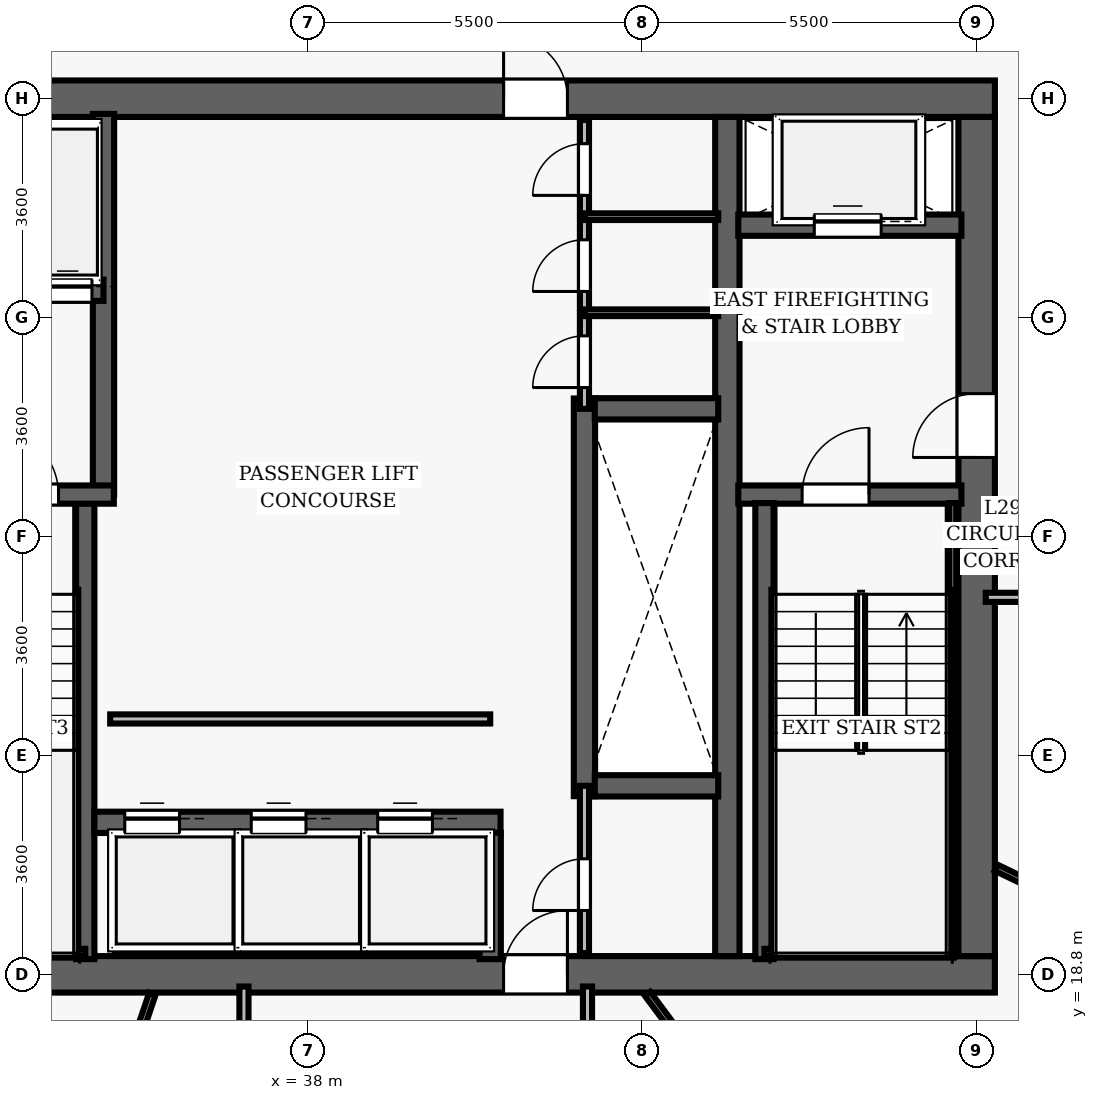
"""IFC4 building model, lengths in metres.
Left out: names, types, materials, properties, quantities, classifications, styles, units other than length and angle.
Written with IfcOpenShell. Run it as: python <this file> out.ifc"""

import sys

from ifc_helpers import new_model, si_unit, direction, frame, frame_2d, origin, place, context, subcontext, project, spatial, rectangle, extrude, element, fill, save


model = new_model("IFC4")
c1 = context("Model", 3, precision=1e-05, world=origin(), true_north=direction((0.0, 1.0)))
c2 = subcontext(c1, "Body", "Model", "MODEL_VIEW")
j1 = project(units=[si_unit("LENGTHUNIT", "METRE"), si_unit("PLANEANGLEUNIT", "RADIAN")], contexts=[c1])
p1 = place(None, origin())
s1 = spatial("IfcSite", under=j1, at=p1, CompositionType="ELEMENT")
p2 = place(p1, origin())
s2 = spatial("IfcBuilding", under=s1, at=p2, CompositionType="ELEMENT")
p3 = place(p2, frame((0.0, 0.0, 120.3)))
s3 = spatial("IfcBuildingStorey", under=s2, at=p3, CompositionType="ELEMENT", Elevation=120.3)
p4 = place(p3, frame((26.7, 18.8, 0.0), z_axis=(0.0, 0.0, 1.0), x_axis=(1.0, 0.0, 0.0)))
e1 = element("IfcWall", 1, at=p4, inside=s3, PredefinedType="SHEAR", context=c2, shape_type="SweptSolid", body=[
    extrude(rectangle(XDim=22.6, YDim=0.6, at=frame_2d((11.3, 0.0))), origin(), (0.0, 0.0, 1.0), 3.5),
])
p5 = place(p4, frame((14.52, 0.0, 0.0)))
e2 = element("IfcOpeningElement", 2, at=p5, cuts=e1, PredefinedType="OPENING", context=c2, shape_type="SweptSolid", body=[
    extrude(rectangle(XDim=1.05, YDim=2.15, at=frame_2d((0.525, 1.075))), frame((0.0, 0.31, 0.0), z_axis=(0.0, -1.0, 0.0), x_axis=(1.0, 0.0, 0.0)), (0.0, 0.0, 1.0), 0.62),
])
p6 = place(p3, frame((26.7, 33.2, 0.0), z_axis=(0.0, 0.0, 1.0), x_axis=(1.0, 0.0, 0.0)))
e3 = element("IfcWall", 3, at=p6, inside=s3, PredefinedType="SHEAR", context=c2, shape_type="SweptSolid", body=[
    extrude(rectangle(XDim=22.6, YDim=0.6, at=frame_2d((11.3, 0.0))), origin(), (0.0, 0.0, 1.0), 3.5),
])
p7 = place(p6, frame((4.62, 0.0, 0.0)))
e4 = element("IfcOpeningElement", 4, at=p7, cuts=e3, PredefinedType="OPENING", context=c2, shape_type="SweptSolid", body=[
    extrude(rectangle(XDim=1.05, YDim=2.15, at=frame_2d((0.525, 1.075))), frame((0.0, 0.31, 0.0), z_axis=(0.0, -1.0, 0.0), x_axis=(1.0, 0.0, 0.0)), (0.0, 0.0, 1.0), 0.62),
])
p8 = place(p6, frame((14.52, 0.0, 0.0)))
e5 = element("IfcOpeningElement", 5, at=p8, cuts=e3, PredefinedType="OPENING", context=c2, shape_type="SweptSolid", body=[
    extrude(rectangle(XDim=1.05, YDim=2.15, at=frame_2d((0.525, 1.075))), frame((0.0, 0.31, 0.0), z_axis=(0.0, -1.0, 0.0), x_axis=(1.0, 0.0, 0.0)), (0.0, 0.0, 1.0), 0.62),
])
p9 = place(p3, frame((49.0, 19.1, 0.0), z_axis=(0.0, 0.0, 1.0), x_axis=(0.0, 1.0, 0.0)))
e6 = element("IfcWall", 6, at=p9, inside=s3, PredefinedType="SHEAR", context=c2, shape_type="SweptSolid", body=[
    extrude(rectangle(XDim=13.8, YDim=0.6, at=frame_2d((6.9, 0.0))), origin(), (0.0, 0.0, 1.0), 3.5),
])
p10 = place(p9, frame((8.2, 0.0, 0.0)))
e7 = element("IfcOpeningElement", 7, at=p10, cuts=e6, PredefinedType="OPENING", context=c2, shape_type="SweptSolid", body=[
    extrude(rectangle(XDim=1.05, YDim=2.15, at=frame_2d((0.525, 1.075))), frame((0.0, 0.31, 0.0), z_axis=(0.0, -1.0, 0.0), x_axis=(1.0, 0.0, 0.0)), (0.0, 0.0, 1.0), 0.62),
])
p11 = place(p3, frame((44.9, 19.1, 0.0), z_axis=(0.0, 0.0, 1.0), x_axis=(0.0, 1.0, 0.0)))
e8 = element("IfcWall", 8, at=p11, inside=s3, PredefinedType="SHEAR", context=c2, shape_type="SweptSolid", body=[
    extrude(rectangle(XDim=13.8, YDim=0.4, at=frame_2d((6.9, 0.0))), origin(), (0.0, 0.0, 1.0), 3.5),
])
p12 = place(p3, frame((45.08, 26.69, 0.0), z_axis=(0.0, 0.0, 1.0), x_axis=(1.0, 0.0, 0.0)))
e9 = element("IfcWall", 9, at=p12, inside=s3, PredefinedType="SHEAR", context=c2, shape_type="SweptSolid", body=[
    extrude(rectangle(XDim=3.67, YDim=0.3, at=frame_2d((1.835, 0.0))), origin(), (0.0, 0.0, 1.0), 3.5),
])
p13 = place(p12, frame((1.05, 0.0, 0.0)))
e10 = element("IfcOpeningElement", 10, at=p13, cuts=e9, PredefinedType="OPENING", context=c2, shape_type="SweptSolid", body=[
    extrude(rectangle(XDim=1.1, YDim=2.15, at=frame_2d((0.55, 1.075))), frame((0.0, 0.16, 0.0), z_axis=(0.0, -1.0, 0.0), x_axis=(1.0, 0.0, 0.0)), (0.0, 0.0, 1.0), 0.32),
])
p14 = place(p3, frame((45.51, 19.05, 0.0), z_axis=(0.0, 0.0, 1.0), x_axis=(0.0, 1.0, 0.0)))
e11 = element("IfcWall", 11, at=p14, inside=s3, PredefinedType="SHEAR", context=c2, shape_type="SweptSolid", body=[
    extrude(rectangle(XDim=7.5, YDim=0.3, at=frame_2d((3.75, 0.0))), origin(), (0.0, 0.0, 1.0), 3.5),
])
p15 = place(p3, frame((48.605, 19.1, 0.0), z_axis=(0.0, 0.0, 1.0), x_axis=(0.0, 1.0, 0.0)))
e12 = element("IfcWall", 12, at=p15, inside=s3, PredefinedType="SHEAR", context=c2, shape_type="SweptSolid", body=[
    extrude(rectangle(XDim=7.45, YDim=0.12, at=frame_2d((3.725, 0.0))), origin(), (0.0, 0.0, 1.0), 3.5),
])
p16 = place(p3, frame((45.51, 19.16, 0.0), z_axis=(0.0, 0.0, 1.0), x_axis=(1.0, 0.0, 0.0)))
e13 = element("IfcWall", 13, at=p16, inside=s3, PredefinedType="SHEAR", context=c2, shape_type="SweptSolid", body=[
    extrude(rectangle(XDim=3.095, YDim=0.12, at=frame_2d((1.547, 0.0))), origin(), (0.0, 0.0, 1.0), 3.5),
])
p17 = place(p3, frame((45.08, 31.12, 0.0), z_axis=(0.0, 0.0, 1.0), x_axis=(1.0, 0.0, 0.0)))
e14 = element("IfcWall", 14, at=p17, inside=s3, PredefinedType="SHEAR", context=c2, shape_type="SweptSolid", body=[
    extrude(rectangle(XDim=3.67, YDim=0.35, at=frame_2d((1.835, 0.0))), origin(), (0.0, 0.0, 1.0), 2.675),
])
p18 = place(p17, frame((1.25, 0.0, 0.0)))
e15 = element("IfcOpeningElement", 15, at=p18, cuts=e14, PredefinedType="OPENING", context=c2, shape_type="SweptSolid", body=[
    extrude(rectangle(XDim=1.1, YDim=2.15, at=frame_2d((0.55, 1.075))), frame((0.0, 0.185, 0.0), z_axis=(0.0, -1.0, 0.0), x_axis=(1.0, 0.0, 0.0)), (0.0, 0.0, 1.0), 0.37),
])
p19 = place(p3, frame((34.34, 19.05, 0.0), z_axis=(0.0, 0.0, 1.0), x_axis=(0.0, 1.0, 0.0)))
e16 = element("IfcWall", 16, at=p19, inside=s3, PredefinedType="SHEAR", context=c2, shape_type="SweptSolid", body=[
    extrude(rectangle(XDim=7.5, YDim=0.3, at=frame_2d((3.75, 0.0))), origin(), (0.0, 0.0, 1.0), 3.5),
])
p20 = place(p3, frame((34.64, 26.69, 0.0), z_axis=(0.0, 0.0, 1.0), x_axis=(0.0, 1.0, 0.0)))
e17 = element("IfcWall", 17, at=p20, inside=s3, PredefinedType="SHEAR", context=c2, shape_type="SweptSolid", body=[
    extrude(rectangle(XDim=6.26, YDim=0.35, at=frame_2d((3.13, 0.0))), origin(), (0.0, 0.0, 1.0), 3.5),
])
p21 = place(p3, frame((31.25, 26.69, 0.0), z_axis=(0.0, 0.0, 1.0), x_axis=(1.0, 0.0, 0.0)))
e18 = element("IfcWall", 18, at=p21, inside=s3, PredefinedType="SHEAR", context=c2, shape_type="SweptSolid", body=[
    extrude(rectangle(XDim=3.56, YDim=0.3, at=frame_2d((1.78, 0.0))), origin(), (0.0, 0.0, 1.0), 3.5),
])
p22 = place(p21, frame((1.55, 0.0, 0.0)))
e19 = element("IfcOpeningElement", 19, at=p22, cuts=e18, PredefinedType="OPENING", context=c2, shape_type="SweptSolid", body=[
    extrude(rectangle(XDim=1.1, YDim=2.15, at=frame_2d((0.55, 1.075))), frame((0.0, 0.16, 0.0), z_axis=(0.0, -1.0, 0.0), x_axis=(1.0, 0.0, 0.0)), (0.0, 0.0, 1.0), 0.32),
])
p23 = place(p3, frame((31.3, 19.16, 0.0), z_axis=(0.0, 0.0, 1.0), x_axis=(1.0, 0.0, 0.0)))
e20 = element("IfcWall", 20, at=p23, inside=s3, PredefinedType="SHEAR", context=c2, shape_type="SweptSolid", body=[
    extrude(rectangle(XDim=3.04, YDim=0.12, at=frame_2d((1.52, 0.0))), origin(), (0.0, 0.0, 1.0), 3.5),
])
p24 = place(p3, frame((32.23, 30.05, 0.0), z_axis=(0.0, 0.0, 1.0), x_axis=(1.0, 0.0, 0.0)))
e21 = element("IfcWall", 21, at=p24, inside=s3, PredefinedType="SHEAR", context=c2, shape_type="SweptSolid", body=[
    extrude(rectangle(XDim=2.41, YDim=0.35, at=frame_2d((1.205, 0.0))), origin(), (0.0, 0.0, 1.0), 2.675),
])
p25 = place(p24, frame((0.42, 0.0, 0.0)))
e22 = element("IfcOpeningElement", 22, at=p25, cuts=e21, PredefinedType="OPENING", context=c2, shape_type="SweptSolid", body=[
    extrude(rectangle(XDim=0.8, YDim=2.15, at=frame_2d((0.4, 1.075))), frame((0.0, 0.185, 0.0), z_axis=(0.0, -1.0, 0.0), x_axis=(1.0, 0.0, 0.0)), (0.0, 0.0, 1.0), 0.37),
])
p26 = place(p24, frame((1.42, 0.0, 0.0)))
e23 = element("IfcOpeningElement", 23, at=p26, cuts=e21, PredefinedType="OPENING", context=c2, shape_type="SweptSolid", body=[
    extrude(rectangle(XDim=0.8, YDim=2.15, at=frame_2d((0.4, 1.075))), frame((0.0, 0.185, 0.0), z_axis=(0.0, -1.0, 0.0), x_axis=(1.0, 0.0, 0.0)), (0.0, 0.0, 1.0), 0.37),
])
p27 = place(p3, frame((42.55, 21.73, 0.0), z_axis=(0.0, 0.0, 1.0), x_axis=(0.0, 1.0, 0.0)))
e24 = element("IfcWall", 24, at=p27, inside=s3, PredefinedType="SHEAR", context=c2, shape_type="SweptSolid", body=[
    extrude(rectangle(XDim=6.54, YDim=0.35, at=frame_2d((3.27, 0.0))), origin(), (0.0, 0.0, 1.0), 2.675),
])
for number, where, z_axis, x_axis in (
    (25, (42.72, 21.9, 0.0), (0.0, 0.0, 1.0), (1.0, 0.0, 0.0)),
    (26, (42.72, 28.1, 0.0), (0.0, 0.0, 1.0), (1.0, 0.0, 0.0)),
):
    element("IfcWall", number, at=place(p3, frame(where, z_axis=z_axis, x_axis=x_axis)), inside=s3, PredefinedType="SHEAR", context=c2, shape_type="SweptSolid", body=[
        extrude(rectangle(XDim=2.03, YDim=0.35, at=frame_2d((1.015, 0.0))), origin(), (0.0, 0.0, 1.0), 2.675),
    ])
p28 = place(p3, frame((34.49, 21.3, 0.0), z_axis=(0.0, 0.0, 1.0), x_axis=(1.0, 0.0, 0.0)))
e27 = element("IfcWall", 27, at=p28, inside=s3, PredefinedType="SHEAR", context=c2, shape_type="SweptSolid", body=[
    extrude(rectangle(XDim=6.68, YDim=0.35, at=frame_2d((3.34, 0.0))), origin(), (0.0, 0.0, 1.0), 2.675),
])
p29 = place(p28, frame((0.5, 0.0, 0.0)))
e28 = element("IfcOpeningElement", 28, at=p29, cuts=e27, PredefinedType="OPENING", context=c2, shape_type="SweptSolid", body=[
    extrude(rectangle(XDim=0.9, YDim=2.15, at=frame_2d((0.45, 1.075))), frame((0.0, 0.185, 0.0), z_axis=(0.0, -1.0, 0.0), x_axis=(1.0, 0.0, 0.0)), (0.0, 0.0, 1.0), 0.37),
])
p30 = place(p28, frame((2.58, 0.0, 0.0)))
e29 = element("IfcOpeningElement", 29, at=p30, cuts=e27, PredefinedType="OPENING", context=c2, shape_type="SweptSolid", body=[
    extrude(rectangle(XDim=0.9, YDim=2.15, at=frame_2d((0.45, 1.075))), frame((0.0, 0.185, 0.0), z_axis=(0.0, -1.0, 0.0), x_axis=(1.0, 0.0, 0.0)), (0.0, 0.0, 1.0), 0.37),
])
p31 = place(p28, frame((4.66, 0.0, 0.0)))
e30 = element("IfcOpeningElement", 30, at=p31, cuts=e27, PredefinedType="OPENING", context=c2, shape_type="SweptSolid", body=[
    extrude(rectangle(XDim=0.9, YDim=2.15, at=frame_2d((0.45, 1.075))), frame((0.0, 0.185, 0.0), z_axis=(0.0, -1.0, 0.0), x_axis=(1.0, 0.0, 0.0)), (0.0, 0.0, 1.0), 0.37),
])
p32 = place(p3, frame((41.0, 19.05, 0.0), z_axis=(0.0, 0.0, 1.0), x_axis=(0.0, 1.0, 0.0)))
e31 = element("IfcWall", 31, at=p32, inside=s3, PredefinedType="SHEAR", context=c2, shape_type="SweptSolid", body=[
    extrude(rectangle(XDim=2.08, YDim=0.35, at=frame_2d((1.04, 0.0))), origin(), (0.0, 0.0, 1.0), 2.675),
])
p33 = place(p3, frame((34.75, 23.0, 0.0), z_axis=(0.0, 0.0, 1.0), x_axis=(1.0, 0.0, 0.0)))
e32 = element("IfcWall", 32, at=p33, inside=s3, PredefinedType="PARTITIONING", context=c2, shape_type="SweptSolid", body=[
    extrude(rectangle(XDim=6.25, YDim=0.15, at=frame_2d((3.125, 0.0))), origin(), (0.0, 0.0, 1.0), 2.675),
])
p34 = place(p3, frame((42.55, 28.1, 0.0), z_axis=(0.0, 0.0, 1.0), x_axis=(0.0, 1.0, 0.0)))
e33 = element("IfcWall", 33, at=p34, inside=s3, PredefinedType="PARTITIONING", context=c2, shape_type="SweptSolid", body=[
    extrude(rectangle(XDim=4.75, YDim=0.15, at=frame_2d((2.375, 0.0))), origin(), (0.0, 0.0, 1.0), 2.675),
])
p35 = place(p34, frame((0.35, 0.0, 0.0)))
e34 = element("IfcOpeningElement", 34, at=p35, cuts=e33, PredefinedType="OPENING", context=c2, shape_type="SweptSolid", body=[
    extrude(rectangle(XDim=0.85, YDim=2.1, at=frame_2d((0.425, 1.05))), frame((0.0, 0.085, 0.0), z_axis=(0.0, -1.0, 0.0), x_axis=(1.0, 0.0, 0.0)), (0.0, 0.0, 1.0), 0.17),
])
p36 = place(p34, frame((1.93, 0.0, 0.0)))
e35 = element("IfcOpeningElement", 35, at=p36, cuts=e33, PredefinedType="OPENING", context=c2, shape_type="SweptSolid", body=[
    extrude(rectangle(XDim=0.85, YDim=2.1, at=frame_2d((0.425, 1.05))), frame((0.0, 0.085, 0.0), z_axis=(0.0, -1.0, 0.0), x_axis=(1.0, 0.0, 0.0)), (0.0, 0.0, 1.0), 0.17),
])
p37 = place(p34, frame((3.51, 0.0, 0.0)))
e36 = element("IfcOpeningElement", 36, at=p37, cuts=e33, PredefinedType="OPENING", context=c2, shape_type="SweptSolid", body=[
    extrude(rectangle(XDim=0.85, YDim=2.1, at=frame_2d((0.425, 1.05))), frame((0.0, 0.085, 0.0), z_axis=(0.0, -1.0, 0.0), x_axis=(1.0, 0.0, 0.0)), (0.0, 0.0, 1.0), 0.17),
])
for number, where, z_axis, x_axis in (
    (37, (42.55, 29.68, 0.0), (0.0, 0.0, 1.0), (1.0, 0.0, 0.0)),
    (38, (42.55, 31.26, 0.0), (0.0, 0.0, 1.0), (1.0, 0.0, 0.0)),
):
    element("IfcWall", number, at=place(p3, frame(where, z_axis=z_axis, x_axis=x_axis)), inside=s3, PredefinedType="PARTITIONING", context=c2, shape_type="SweptSolid", body=[
        extrude(rectangle(XDim=2.2, YDim=0.11, at=frame_2d((1.1, 0.0))), origin(), (0.0, 0.0, 1.0), 2.675),
    ])
p38 = place(p3, frame((42.55, 19.15, 0.0), z_axis=(0.0, 0.0, 1.0), x_axis=(0.0, 1.0, 0.0)))
e39 = element("IfcWall", 39, at=p38, inside=s3, PredefinedType="PARTITIONING", context=c2, shape_type="SweptSolid", body=[
    extrude(rectangle(XDim=2.75, YDim=0.15, at=frame_2d((1.375, 0.0))), origin(), (0.0, 0.0, 1.0), 2.675),
])
p39 = place(p38, frame((0.7, 0.0, 0.0)))
e40 = element("IfcOpeningElement", 40, at=p39, cuts=e39, PredefinedType="OPENING", context=c2, shape_type="SweptSolid", body=[
    extrude(rectangle(XDim=0.85, YDim=2.1, at=frame_2d((0.425, 1.05))), frame((0.0, 0.085, 0.0), z_axis=(0.0, -1.0, 0.0), x_axis=(1.0, 0.0, 0.0)), (0.0, 0.0, 1.0), 0.17),
])
p40 = place(p3, frame((49.15, 25.0, 0.0), z_axis=(0.0, 0.0, 1.0), x_axis=(1.0, 0.0, 0.0)))
e41 = element("IfcWall", 41, at=p40, inside=s3, PredefinedType="PARTITIONING", context=c2, shape_type="SweptSolid", body=[
    extrude(rectangle(XDim=12.35, YDim=0.15, at=frame_2d((6.175, 0.0))), origin(), (0.0, 0.0, 1.0), 2.675),
])
p41 = place(p40, frame((2.613, 0.0, 0.0)))
e42 = element("IfcOpeningElement", 42, at=p41, cuts=e41, PredefinedType="OPENING", context=c2, shape_type="SweptSolid", body=[
    extrude(rectangle(XDim=0.95, YDim=2.15, at=frame_2d((0.475, 1.075))), frame((0.0, 0.085, 0.0), z_axis=(0.0, -1.0, 0.0), x_axis=(1.0, 0.0, 0.0)), (0.0, 0.0, 1.0), 0.17),
])
p42 = place(p3, frame((36.95, 11.2, 0.0), z_axis=(0.0, 0.0, 1.0), x_axis=(0.0, 1.0, 0.0)))
e43 = element("IfcWall", 43, at=p42, inside=s3, PredefinedType="PARTITIONING", context=c2, shape_type="SweptSolid", body=[
    extrude(rectangle(XDim=7.4, YDim=0.15, at=frame_2d((3.7, 0.0))), origin(), (0.0, 0.0, 1.0), 2.675),
])
p43 = place(p42, frame((5.075, 0.0, 0.0)))
e44 = element("IfcOpeningElement", 44, at=p43, cuts=e43, PredefinedType="OPENING", context=c2, shape_type="SweptSolid", body=[
    extrude(rectangle(XDim=0.95, YDim=2.15, at=frame_2d((0.475, 1.075))), frame((0.0, 0.085, 0.0), z_axis=(0.0, -1.0, 0.0), x_axis=(1.0, 0.0, 0.0)), (0.0, 0.0, 1.0), 0.17),
])
p44 = place(p3, frame((42.6, 16.65, 0.0), z_axis=(0.0, 0.0, 1.0), x_axis=(0.0, 1.0, 0.0)))
e45 = element("IfcWall", 45, at=p44, inside=s3, PredefinedType="PARTITIONING", context=c2, shape_type="SweptSolid", body=[
    extrude(rectangle(XDim=1.95, YDim=0.15, at=frame_2d((0.975, 0.0))), origin(), (0.0, 0.0, 1.0), 2.675),
])
p45 = place(p3, frame((35.445, 18.48, 0.0), z_axis=(0.0, 0.0, 1.0), x_axis=(-0.321757380661, -0.946822152249, 0.0)))
e46 = element("IfcWall", 46, at=p45, inside=s3, PredefinedType="PARTITIONING", context=c2, shape_type="SweptSolid", body=[
    extrude(rectangle(XDim=14.966, YDim=0.11, at=frame_2d((7.483, 0.0))), origin(), (0.0, 0.0, 1.0), 2.675),
])
p46 = place(p3, frame((43.588, 18.48, 0.0), z_axis=(0.0, 0.0, 1.0), x_axis=(0.596448533395, -0.802651323434, 0.0)))
e47 = element("IfcWall", 47, at=p46, inside=s3, PredefinedType="PARTITIONING", context=c2, shape_type="SweptSolid", body=[
    extrude(rectangle(XDim=15.953, YDim=0.11, at=frame_2d((7.977, 0.0))), origin(), (0.0, 0.0, 1.0), 2.675),
])
p47 = place(p3, frame((49.32, 20.554, 0.0), z_axis=(0.0, 0.0, 1.0), x_axis=(0.901135756716, -0.433537020296, 0.0)))
e48 = element("IfcWall", 48, at=p47, inside=s3, PredefinedType="PARTITIONING", context=c2, shape_type="SweptSolid", body=[
    extrude(rectangle(XDim=15.547, YDim=0.11, at=frame_2d((7.773, 0.0))), origin(), (0.0, 0.0, 1.0), 2.675),
])
p48 = place(p13, origin())
e49 = element("IfcDoor", 49, at=p48, inside=s3, OperationType="SINGLE_SWING_RIGHT", PredefinedType="DOOR", context=c2, shape_type="SweptSolid", body=[
    extrude(rectangle(XDim=1.1, YDim=2.15, at=frame_2d((0.55, 1.075))), frame((0.0, 0.025, 0.0), z_axis=(0.0, -1.0, 0.0), x_axis=(1.0, 0.0, 0.0)), (0.0, 0.0, 1.0), 0.05),
])
fill(e10, e49)
p49 = place(p10, origin())
e50 = element("IfcDoor", 50, at=p49, inside=s3, OperationType="SINGLE_SWING_LEFT", PredefinedType="DOOR", context=c2, shape_type="SweptSolid", body=[
    extrude(rectangle(XDim=1.05, YDim=2.15, at=frame_2d((0.525, 1.075))), frame((0.0, 0.025, 0.0), z_axis=(0.0, -1.0, 0.0), x_axis=(1.0, 0.0, 0.0)), (0.0, 0.0, 1.0), 0.05),
])
fill(e7, e50)
p50 = place(p22, origin())
e51 = element("IfcDoor", 51, at=p50, inside=s3, OperationType="SINGLE_SWING_LEFT", PredefinedType="DOOR", context=c2, shape_type="SweptSolid", body=[
    extrude(rectangle(XDim=1.1, YDim=2.15, at=frame_2d((0.55, 1.075))), frame((0.0, 0.025, 0.0), z_axis=(0.0, -1.0, 0.0), x_axis=(1.0, 0.0, 0.0)), (0.0, 0.0, 1.0), 0.05),
])
fill(e19, e51)
p51 = place(p8, origin())
e52 = element("IfcDoor", 52, at=p51, inside=s3, OperationType="SINGLE_SWING_LEFT", PredefinedType="DOOR", context=c2, shape_type="SweptSolid", body=[
    extrude(rectangle(XDim=1.05, YDim=2.15, at=frame_2d((0.525, 1.075))), frame((0.0, 0.025, 0.0), z_axis=(0.0, -1.0, 0.0), x_axis=(1.0, 0.0, 0.0)), (0.0, 0.0, 1.0), 0.05),
])
fill(e5, e52)
p52 = place(p5, origin())
e53 = element("IfcDoor", 53, at=p52, inside=s3, OperationType="SINGLE_SWING_RIGHT", PredefinedType="DOOR", context=c2, shape_type="SweptSolid", body=[
    extrude(rectangle(XDim=1.05, YDim=2.15, at=frame_2d((0.525, 1.075))), frame((0.0, 0.025, 0.0), z_axis=(0.0, -1.0, 0.0), x_axis=(1.0, 0.0, 0.0)), (0.0, 0.0, 1.0), 0.05),
])
fill(e2, e53)
p53 = place(p35, origin())
e54 = element("IfcDoor", 54, at=p53, inside=s3, OperationType="SINGLE_SWING_LEFT", PredefinedType="DOOR", context=c2, shape_type="SweptSolid", body=[
    extrude(rectangle(XDim=0.85, YDim=2.1, at=frame_2d((0.425, 1.05))), frame((0.0, 0.025, 0.0), z_axis=(0.0, -1.0, 0.0), x_axis=(1.0, 0.0, 0.0)), (0.0, 0.0, 1.0), 0.05),
])
fill(e34, e54)
p54 = place(p36, origin())
e55 = element("IfcDoor", 55, at=p54, inside=s3, OperationType="SINGLE_SWING_LEFT", PredefinedType="DOOR", context=c2, shape_type="SweptSolid", body=[
    extrude(rectangle(XDim=0.85, YDim=2.1, at=frame_2d((0.425, 1.05))), frame((0.0, 0.025, 0.0), z_axis=(0.0, -1.0, 0.0), x_axis=(1.0, 0.0, 0.0)), (0.0, 0.0, 1.0), 0.05),
])
fill(e35, e55)
p55 = place(p37, origin())
e56 = element("IfcDoor", 56, at=p55, inside=s3, OperationType="SINGLE_SWING_LEFT", PredefinedType="DOOR", context=c2, shape_type="SweptSolid", body=[
    extrude(rectangle(XDim=0.85, YDim=2.1, at=frame_2d((0.425, 1.05))), frame((0.0, 0.025, 0.0), z_axis=(0.0, -1.0, 0.0), x_axis=(1.0, 0.0, 0.0)), (0.0, 0.0, 1.0), 0.05),
])
fill(e36, e56)
p56 = place(p39, origin())
e57 = element("IfcDoor", 57, at=p56, inside=s3, OperationType="SINGLE_SWING_LEFT", PredefinedType="DOOR", context=c2, shape_type="SweptSolid", body=[
    extrude(rectangle(XDim=0.85, YDim=2.1, at=frame_2d((0.425, 1.05))), frame((0.0, 0.025, 0.0), z_axis=(0.0, -1.0, 0.0), x_axis=(1.0, 0.0, 0.0)), (0.0, 0.0, 1.0), 0.05),
])
fill(e40, e57)
p57 = place(p29, origin())
e58 = element("IfcDoor", 58, at=p57, inside=s3, OperationType="SLIDING_TO_LEFT", PredefinedType="DOOR", context=c2, shape_type="SweptSolid", body=[
    extrude(rectangle(XDim=0.9, YDim=2.15, at=frame_2d((0.45, 1.075))), frame((0.0, 0.025, 0.0), z_axis=(0.0, -1.0, 0.0), x_axis=(1.0, 0.0, 0.0)), (0.0, 0.0, 1.0), 0.05),
])
fill(e28, e58)
p58 = place(p30, origin())
e59 = element("IfcDoor", 59, at=p58, inside=s3, OperationType="SLIDING_TO_LEFT", PredefinedType="DOOR", context=c2, shape_type="SweptSolid", body=[
    extrude(rectangle(XDim=0.9, YDim=2.15, at=frame_2d((0.45, 1.075))), frame((0.0, 0.025, 0.0), z_axis=(0.0, -1.0, 0.0), x_axis=(1.0, 0.0, 0.0)), (0.0, 0.0, 1.0), 0.05),
])
fill(e29, e59)
p59 = place(p31, origin())
e60 = element("IfcDoor", 60, at=p59, inside=s3, OperationType="SLIDING_TO_LEFT", PredefinedType="DOOR", context=c2, shape_type="SweptSolid", body=[
    extrude(rectangle(XDim=0.9, YDim=2.15, at=frame_2d((0.45, 1.075))), frame((0.0, 0.025, 0.0), z_axis=(0.0, -1.0, 0.0), x_axis=(1.0, 0.0, 0.0)), (0.0, 0.0, 1.0), 0.05),
])
fill(e30, e60)
p60 = place(p18, origin())
e61 = element("IfcDoor", 61, at=p60, inside=s3, OperationType="SLIDING_TO_LEFT", PredefinedType="DOOR", context=c2, shape_type="SweptSolid", body=[
    extrude(rectangle(XDim=1.1, YDim=2.15, at=frame_2d((0.55, 1.075))), frame((0.0, 0.025, 0.0), z_axis=(0.0, -1.0, 0.0), x_axis=(1.0, 0.0, 0.0)), (0.0, 0.0, 1.0), 0.05),
])
fill(e15, e61)
p61 = place(p26, origin())
e62 = element("IfcDoor", 62, at=p61, inside=s3, OperationType="SLIDING_TO_LEFT", PredefinedType="DOOR", context=c2, shape_type="SweptSolid", body=[
    extrude(rectangle(XDim=0.8, YDim=2.15, at=frame_2d((0.4, 1.075))), frame((0.0, 0.025, 0.0), z_axis=(0.0, -1.0, 0.0), x_axis=(1.0, 0.0, 0.0)), (0.0, 0.0, 1.0), 0.05),
])
fill(e23, e62)
save(model, sys.argv[1])
